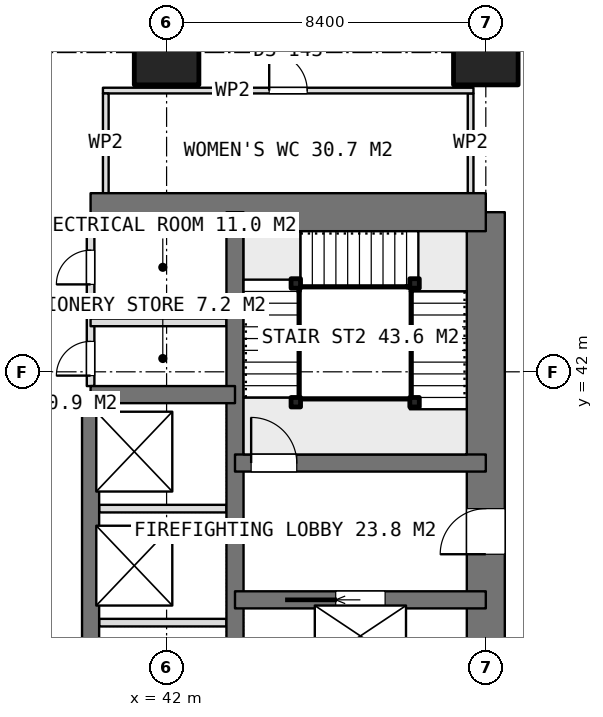
"""IFC4 building model, lengths in metres.
Left out: names, types, materials, properties, quantities, classifications, styles, units other than length and angle.
Written with IfcOpenShell. Run it as: python <this file> out.ifc"""

import sys

from ifc_helpers import new_model, si_unit, direction, frame, frame_2d, origin, origin_2d, place, context, subcontext, project, spatial, rectangle, extrude, element, fill, save


model = new_model("IFC4")
c1 = context("Model", 3, precision=1e-05, world=origin(), true_north=direction((0.0, 1.0)))
c2 = subcontext(c1, "Body", "Model", "MODEL_VIEW")
j1 = project(units=[si_unit("LENGTHUNIT", "METRE"), si_unit("PLANEANGLEUNIT", "RADIAN")], contexts=[c1])
p1 = place(None, origin())
s1 = spatial("IfcSite", under=j1, at=p1, CompositionType="ELEMENT")
p2 = place(p1, origin())
s2 = spatial("IfcBuilding", under=s1, at=p2, CompositionType="ELEMENT")
p3 = place(p2, frame((0.0, 0.0, 132.8)))
s3 = spatial("IfcBuildingStorey", under=s2, at=p3, CompositionType="ELEMENT", Elevation=132.8)
p4 = place(p3, frame((40.0, 46.2, 0.0), z_axis=(0.0, 0.0, 1.0), x_axis=(1.0, 0.0, 0.0)))
e1 = element("IfcWall", 1, at=p4, inside=s3, PredefinedType="SHEAR", context=c2, shape_type="SweptSolid", body=[
    extrude(rectangle(XDim=10.4, YDim=1.0, at=frame_2d((5.2, 0.0))), origin(), (0.0, 0.0, 1.0), 3.75),
])
p5 = place(p3, frame((50.4, 21.0, 0.0), z_axis=(0.0, 0.0, 1.0), x_axis=(0.0, 1.0, 0.0)))
e2 = element("IfcWall", 2, at=p5, inside=s3, PredefinedType="SHEAR", context=c2, shape_type="SweptSolid", body=[
    extrude(rectangle(XDim=25.2, YDim=1.0, at=frame_2d((12.6, 0.0))), origin(), (0.0, 0.0, 1.0), 3.75),
])
p6 = place(p5, frame((16.2, 0.0, 0.0)))
e3 = element("IfcOpeningElement", 3, at=p6, cuts=e2, PredefinedType="OPENING", context=c2, shape_type="SweptSolid", body=[
    extrude(rectangle(XDim=1.2, YDim=2.1, at=frame_2d((0.6, 1.05))), frame((0.0, 0.51, 0.0), z_axis=(0.0, -1.0, 0.0), x_axis=(1.0, 0.0, 0.0)), (0.0, 0.0, 1.0), 1.02),
])
p7 = place(p5, frame((10.05, 0.0, 0.0)))
e4 = element("IfcOpeningElement", 4, at=p7, cuts=e2, PredefinedType="OPENING", context=c2, shape_type="SweptSolid", body=[
    extrude(rectangle(XDim=0.9, YDim=2.1, at=frame_2d((0.45, 1.05))), frame((0.0, 0.51, 0.0), z_axis=(0.0, -1.0, 0.0), x_axis=(1.0, 0.0, 0.0)), (0.0, 0.0, 1.0), 1.02),
])
p8 = place(p5, frame((7.45, 0.0, 0.0)))
e5 = element("IfcOpeningElement", 5, at=p8, cuts=e2, PredefinedType="OPENING", context=c2, shape_type="SweptSolid", body=[
    extrude(rectangle(XDim=0.9, YDim=2.1, at=frame_2d((0.45, 1.05))), frame((0.0, 0.51, 0.0), z_axis=(0.0, -1.0, 0.0), x_axis=(1.0, 0.0, 0.0)), (0.0, 0.0, 1.0), 1.02),
])
p9 = place(p5, frame((0.7, 0.0, 0.0)))
e6 = element("IfcOpeningElement", 6, at=p9, cuts=e2, PredefinedType="OPENING", context=c2, shape_type="SweptSolid", body=[
    extrude(rectangle(XDim=1.2, YDim=2.1, at=frame_2d((0.6, 1.05))), frame((0.0, 0.51, 0.0), z_axis=(0.0, -1.0, 0.0), x_axis=(1.0, 0.0, 0.0)), (0.0, 0.0, 1.0), 1.02),
])
p10 = place(p3, frame((43.8, 21.0, 0.0), z_axis=(0.0, 0.0, 1.0), x_axis=(0.0, 1.0, 0.0)))
e7 = element("IfcWall", 7, at=p10, inside=s3, PredefinedType="SHEAR", context=c2, shape_type="SweptSolid", body=[
    extrude(rectangle(XDim=25.2, YDim=0.45, at=frame_2d((12.6, 0.0))), origin(), (0.0, 0.0, 1.0), 3.75),
])
p11 = place(p3, frame((40.0, 23.4, 0.0), z_axis=(0.0, 0.0, 1.0), x_axis=(0.0, 1.0, 0.0)))
e8 = element("IfcWall", 8, at=p11, inside=s3, PredefinedType="SHEAR", context=c2, shape_type="SweptSolid", body=[
    extrude(rectangle(XDim=18.0, YDim=0.45, at=frame_2d((9.0, 0.0))), origin(), (0.0, 0.0, 1.0), 3.75),
])
p12 = place(p11, frame((1.7, 0.0, 0.0)))
e9 = element("IfcOpeningElement", 9, at=p12, cuts=e8, PredefinedType="OPENING", context=c2, shape_type="SweptSolid", body=[
    extrude(rectangle(XDim=1.0, YDim=2.1, at=frame_2d((0.5, 1.05))), frame((0.0, 0.235, 0.0), z_axis=(0.0, -1.0, 0.0), x_axis=(1.0, 0.0, 0.0)), (0.0, 0.0, 1.0), 0.47),
])
p13 = place(p11, frame((4.75, 0.0, 0.0)))
e10 = element("IfcOpeningElement", 10, at=p13, cuts=e8, PredefinedType="OPENING", context=c2, shape_type="SweptSolid", body=[
    extrude(rectangle(XDim=0.9, YDim=2.1, at=frame_2d((0.45, 1.05))), frame((0.0, 0.235, 0.0), z_axis=(0.0, -1.0, 0.0), x_axis=(1.0, 0.0, 0.0)), (0.0, 0.0, 1.0), 0.47),
])
p14 = place(p3, frame((40.0, 41.4, 0.0), z_axis=(0.0, 0.0, 1.0), x_axis=(1.0, 0.0, 0.0)))
e11 = element("IfcWall", 11, at=p14, inside=s3, PredefinedType="SHEAR", context=c2, shape_type="SweptSolid", body=[
    extrude(rectangle(XDim=3.8, YDim=0.45, at=frame_2d((1.9, 0.0))), origin(), (0.0, 0.0, 1.0), 3.75),
])
p15 = place(p3, frame((43.8, 36.0, 0.0), z_axis=(0.0, 0.0, 1.0), x_axis=(1.0, 0.0, 0.0)))
e12 = element("IfcWall", 12, at=p15, inside=s3, PredefinedType="SHEAR", context=c2, shape_type="SweptSolid", body=[
    extrude(rectangle(XDim=6.6, YDim=0.45, at=frame_2d((3.3, 0.0))), origin(), (0.0, 0.0, 1.0), 3.75),
])
p16 = place(p15, frame((2.65, 0.0, 0.0)))
e13 = element("IfcOpeningElement", 13, at=p16, cuts=e12, PredefinedType="OPENING", context=c2, shape_type="SweptSolid", body=[
    extrude(rectangle(XDim=1.3, YDim=2.1, at=frame_2d((0.65, 1.05))), frame((0.0, 0.235, 0.0), z_axis=(0.0, -1.0, 0.0), x_axis=(1.0, 0.0, 0.0)), (0.0, 0.0, 1.0), 0.47),
])
p17 = place(p3, frame((43.8, 39.6, 0.0), z_axis=(0.0, 0.0, 1.0), x_axis=(1.0, 0.0, 0.0)))
e14 = element("IfcWall", 14, at=p17, inside=s3, PredefinedType="SHEAR", context=c2, shape_type="SweptSolid", body=[
    extrude(rectangle(XDim=6.6, YDim=0.45, at=frame_2d((3.3, 0.0))), origin(), (0.0, 0.0, 1.0), 3.75),
])
p18 = place(p17, frame((0.425, 0.0, 0.0)))
e15 = element("IfcOpeningElement", 15, at=p18, cuts=e14, PredefinedType="OPENING", context=c2, shape_type="SweptSolid", body=[
    extrude(rectangle(XDim=1.2, YDim=2.1, at=frame_2d((0.6, 1.05))), frame((0.0, 0.235, 0.0), z_axis=(0.0, -1.0, 0.0), x_axis=(1.0, 0.0, 0.0)), (0.0, 0.0, 1.0), 0.47),
])
for number, where, z_axis, x_axis in (
    (16, (42.0, 50.4, 0.0), (0.0, 0.0, 1.0), (1.0, 0.0, 0.0)),
    (17, (50.4, 50.4, 0.0), (0.0, 0.0, 1.0), (1.0, 0.0, 0.0)),
):
    element("IfcColumn", number, at=place(p3, frame(where, z_axis=z_axis, x_axis=x_axis)), inside=s3, PredefinedType="COLUMN", context=c2, shape_type="SweptSolid", body=[
        extrude(rectangle(XDim=1.7, YDim=1.7, at=origin_2d()), origin(), (0.0, 0.0, 1.0), 3.75),
    ])
for number, where, z_axis, x_axis in (
    (18, (40.225, 35.4, 0.0), (0.0, 0.0, 1.0), (1.0, 0.0, 0.0)),
    (19, (40.225, 38.4, 0.0), (0.0, 0.0, 1.0), (1.0, 0.0, 0.0)),
):
    element("IfcWall", number, at=place(p3, frame(where, z_axis=z_axis, x_axis=x_axis)), inside=s3, PredefinedType="PARTITIONING", context=c2, shape_type="SweptSolid", body=[
        extrude(rectangle(XDim=3.35, YDim=0.2, at=frame_2d((1.675, 0.0))), origin(), (0.0, 0.0, 1.0), 3.5),
    ])
p19 = place(p3, frame((40.0, 41.625, 0.0), z_axis=(0.0, 0.0, 1.0), x_axis=(0.0, 1.0, 0.0)))
e20 = element("IfcWall", 20, at=p19, inside=s3, PredefinedType="PARTITIONING", context=c2, shape_type="SweptSolid", body=[
    extrude(rectangle(XDim=4.075, YDim=0.2, at=frame_2d((2.038, 0.0))), origin(), (0.0, 0.0, 1.0), 3.5),
])
p20 = place(p19, frame((2.675, 0.0, 0.0)))
e21 = element("IfcOpeningElement", 21, at=p20, cuts=e20, PredefinedType="OPENING", context=c2, shape_type="SweptSolid", body=[
    extrude(rectangle(XDim=0.9, YDim=2.1, at=frame_2d((0.45, 1.05))), frame((0.0, 0.11, 0.0), z_axis=(0.0, -1.0, 0.0), x_axis=(1.0, 0.0, 0.0)), (0.0, 0.0, 1.0), 0.22),
])
p21 = place(p19, frame((0.275, 0.0, 0.0)))
e22 = element("IfcOpeningElement", 22, at=p21, cuts=e20, PredefinedType="OPENING", context=c2, shape_type="SweptSolid", body=[
    extrude(rectangle(XDim=0.9, YDim=2.1, at=frame_2d((0.45, 1.05))), frame((0.0, 0.11, 0.0), z_axis=(0.0, -1.0, 0.0), x_axis=(1.0, 0.0, 0.0)), (0.0, 0.0, 1.0), 0.22),
])
p22 = place(p3, frame((40.0, 43.3, 0.0), z_axis=(0.0, 0.0, 1.0), x_axis=(1.0, 0.0, 0.0)))
e23 = element("IfcWall", 23, at=p22, inside=s3, PredefinedType="PARTITIONING", context=c2, shape_type="SweptSolid", body=[
    extrude(rectangle(XDim=3.575, YDim=0.2, at=frame_2d((1.788, 0.0))), origin(), (0.0, 0.0, 1.0), 3.5),
])
p23 = place(p3, frame((40.325, 49.4, 0.0), z_axis=(0.0, 0.0, 1.0), x_axis=(1.0, 0.0, 0.0)))
e24 = element("IfcWall", 24, at=p23, inside=s3, PredefinedType="PARTITIONING", context=c2, shape_type="SweptSolid", body=[
    extrude(rectangle(XDim=9.75, YDim=0.15, at=frame_2d((4.875, 0.0))), origin(), (0.0, 0.0, 1.0), 3.5),
])
p24 = place(p23, frame((4.375, 0.0, 0.0)))
e25 = element("IfcOpeningElement", 25, at=p24, cuts=e24, PredefinedType="OPENING", context=c2, shape_type="SweptSolid", body=[
    extrude(rectangle(XDim=1.0, YDim=2.1, at=frame_2d((0.5, 1.05))), frame((0.0, 0.085, 0.0), z_axis=(0.0, -1.0, 0.0), x_axis=(1.0, 0.0, 0.0)), (0.0, 0.0, 1.0), 0.17),
])
for number, where, z_axis, x_axis in (
    (26, (40.4, 46.7, 0.0), (0.0, 0.0, 1.0), (0.0, 1.0, 0.0)),
    (27, (50.0, 46.7, 0.0), (0.0, 0.0, 1.0), (0.0, 1.0, 0.0)),
):
    element("IfcWall", number, at=place(p3, frame(where, z_axis=z_axis, x_axis=x_axis)), inside=s3, PredefinedType="PARTITIONING", context=c2, shape_type="SweptSolid", body=[
        extrude(rectangle(XDim=2.625, YDim=0.15, at=frame_2d((1.312, 0.0))), origin(), (0.0, 0.0, 1.0), 3.5),
    ])
for number, where, z_axis, x_axis in (
    (28, (45.4, 41.2, 0.0), (0.0, 0.0, 1.0), (1.0, 0.0, 0.0)),
    (29, (45.4, 44.325, 0.0), (0.0, 0.0, 1.0), (1.0, 0.0, 0.0)),
    (30, (48.525, 44.325, 0.0), (0.0, 0.0, 1.0), (1.0, 0.0, 0.0)),
    (31, (48.525, 41.2, 0.0), (0.0, 0.0, 1.0), (1.0, 0.0, 0.0)),
):
    element("IfcColumn", number, at=place(p3, frame(where, z_axis=z_axis, x_axis=x_axis)), inside=s3, PredefinedType="COLUMN", context=c2, shape_type="SweptSolid", body=[
        extrude(rectangle(XDim=0.25, YDim=0.25, at=origin_2d()), origin(), (0.0, 0.0, 1.0), 3.75),
    ])
p25 = place(p6, origin())
e32 = element("IfcDoor", 32, at=p25, inside=s3, OperationType="SINGLE_SWING_LEFT", PredefinedType="DOOR", context=c2, shape_type="SweptSolid", body=[
    extrude(rectangle(XDim=1.2, YDim=2.1, at=frame_2d((0.6, 1.05))), frame((0.0, 0.025, 0.0), z_axis=(0.0, -1.0, 0.0), x_axis=(1.0, 0.0, 0.0)), (0.0, 0.0, 1.0), 0.05),
])
fill(e3, e32)
p26 = place(p20, origin())
e33 = element("IfcDoor", 33, at=p26, inside=s3, OperationType="SINGLE_SWING_LEFT", PredefinedType="DOOR", context=c2, shape_type="SweptSolid", body=[
    extrude(rectangle(XDim=0.9, YDim=2.1, at=frame_2d((0.45, 1.05))), frame((0.0, 0.025, 0.0), z_axis=(0.0, -1.0, 0.0), x_axis=(1.0, 0.0, 0.0)), (0.0, 0.0, 1.0), 0.05),
])
fill(e21, e33)
p27 = place(p21, origin())
e34 = element("IfcDoor", 34, at=p27, inside=s3, OperationType="SINGLE_SWING_LEFT", PredefinedType="DOOR", context=c2, shape_type="SweptSolid", body=[
    extrude(rectangle(XDim=0.9, YDim=2.1, at=frame_2d((0.45, 1.05))), frame((0.0, 0.025, 0.0), z_axis=(0.0, -1.0, 0.0), x_axis=(1.0, 0.0, 0.0)), (0.0, 0.0, 1.0), 0.05),
])
fill(e22, e34)
p28 = place(p16, origin())
e35 = element("IfcDoor", 35, at=p28, inside=s3, OperationType="SLIDING_TO_LEFT", PredefinedType="USERDEFINED", context=c2, shape_type="SweptSolid", body=[
    extrude(rectangle(XDim=1.3, YDim=2.1, at=frame_2d((0.65, 1.05))), frame((0.0, 0.025, 0.0), z_axis=(0.0, -1.0, 0.0), x_axis=(1.0, 0.0, 0.0)), (0.0, 0.0, 1.0), 0.05),
])
fill(e13, e35)
p29 = place(p24, origin())
e36 = element("IfcDoor", 36, at=p29, inside=s3, OperationType="SINGLE_SWING_LEFT", PredefinedType="DOOR", context=c2, shape_type="SweptSolid", body=[
    extrude(rectangle(XDim=1.0, YDim=2.1, at=frame_2d((0.5, 1.05))), frame((0.0, 0.025, 0.0), z_axis=(0.0, -1.0, 0.0), x_axis=(1.0, 0.0, 0.0)), (0.0, 0.0, 1.0), 0.05),
])
fill(e25, e36)
p30 = place(p18, origin())
e37 = element("IfcDoor", 37, at=p30, inside=s3, OperationType="SINGLE_SWING_RIGHT", PredefinedType="DOOR", context=c2, shape_type="SweptSolid", body=[
    extrude(rectangle(XDim=1.2, YDim=2.1, at=frame_2d((0.6, 1.05))), frame((0.0, 0.025, 0.0), z_axis=(0.0, -1.0, 0.0), x_axis=(1.0, 0.0, 0.0)), (0.0, 0.0, 1.0), 0.05),
])
fill(e15, e37)
save(model, sys.argv[1])
